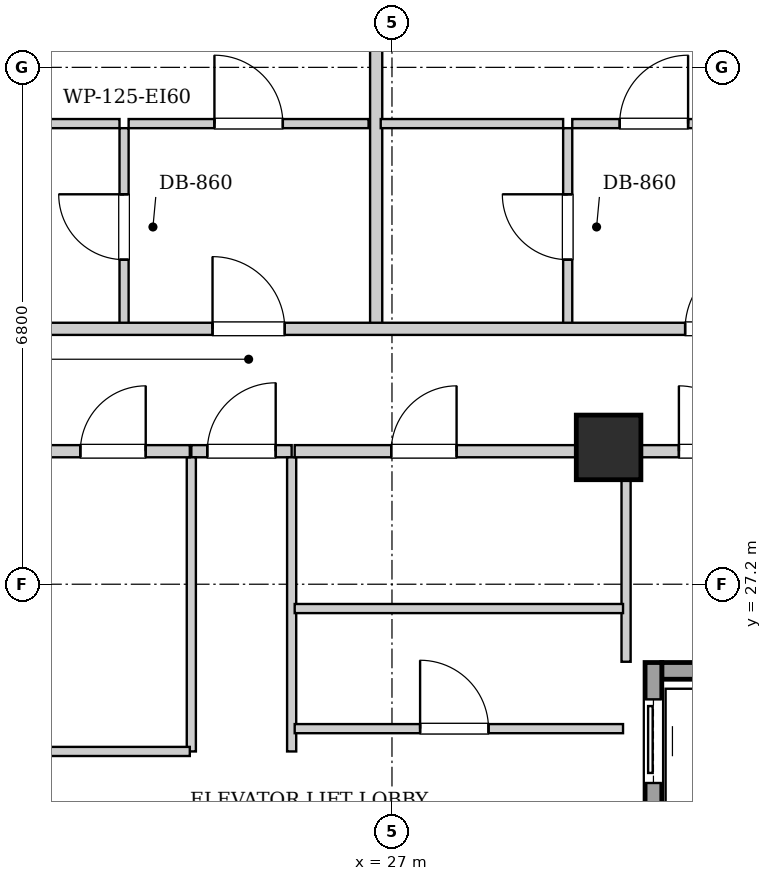
"""IFC4 building model, lengths in metres.
Left out: names, types, materials, properties, quantities, classifications, styles, units other than length and angle.
Written with IfcOpenShell. Run it as: python <this file> out.ifc"""

import sys

from ifc_helpers import new_model, si_unit, direction, frame, frame_2d, origin, origin_2d, place, context, subcontext, project, spatial, rectangle, extrude, element, fill, save


model = new_model("IFC4")
c1 = context("Model", 3, precision=1e-05, world=origin(), true_north=direction((0.0, 1.0)))
c2 = subcontext(c1, "Body", "Model", "MODEL_VIEW")
j1 = project(units=[si_unit("LENGTHUNIT", "METRE"), si_unit("PLANEANGLEUNIT", "RADIAN")], contexts=[c1])
p1 = place(None, origin())
s1 = spatial("IfcSite", under=j1, at=p1, CompositionType="ELEMENT")
p2 = place(p1, origin())
s2 = spatial("IfcBuilding", under=s1, at=p2, CompositionType="ELEMENT")
p3 = place(p2, frame((0.0, 0.0, 214.0)))
s3 = spatial("IfcBuildingStorey", under=s2, at=p3, CompositionType="ELEMENT", Elevation=214.0)
p4 = place(p3, frame((29.85, 29.0, 0.0), z_axis=(0.0, 0.0, 1.0), x_axis=(1.0, 0.0, 0.0)))
e1 = element("IfcColumn", 1, at=p4, inside=s3, PredefinedType="COLUMN", context=c2, shape_type="SweptSolid", body=[
    extrude(rectangle(XDim=0.85, YDim=0.85, at=origin_2d()), origin(), (0.0, 0.0, 1.0), 3.3),
])
p5 = place(p3, frame((30.55, 26.06, 0.0), z_axis=(0.0, 0.0, 1.0), x_axis=(1.0, 0.0, 0.0)))
e2 = element("IfcWall", 2, at=p5, inside=s3, PredefinedType="SHEAR", context=c2, shape_type="SweptSolid", body=[
    extrude(rectangle(XDim=1.9, YDim=0.22, at=frame_2d((0.95, 0.0))), origin(), (0.0, 0.0, 1.0), 3.04),
])
p6 = place(p3, frame((30.44, 24.1, 0.0), z_axis=(0.0, 0.0, 1.0), x_axis=(0.0, 1.0, 0.0)))
e3 = element("IfcWall", 3, at=p6, inside=s3, PredefinedType="SHEAR", context=c2, shape_type="SweptSolid", body=[
    extrude(rectangle(XDim=2.07, YDim=0.22, at=frame_2d((1.035, 0.0))), origin(), (0.0, 0.0, 1.0), 3.04),
])
p7 = place(p6, frame((0.485, 0.0, 0.0)))
e4 = element("IfcOpeningElement", 4, at=p7, cuts=e3, PredefinedType="OPENING", context=c2, shape_type="SweptSolid", body=[
    extrude(rectangle(XDim=1.1, YDim=2.15, at=frame_2d((0.55, 1.075))), frame((0.0, 0.12, 0.0), z_axis=(0.0, -1.0, 0.0), x_axis=(1.0, 0.0, 0.0)), (0.0, 0.0, 1.0), 0.24),
])
p8 = place(p3, frame((24.36, 28.95, 0.0), z_axis=(0.0, 0.0, 1.0), x_axis=(1.0, 0.0, 0.0)))
e5 = element("IfcWall", 5, at=p8, inside=s3, PredefinedType="PARTITIONING", context=c2, shape_type="SweptSolid", body=[
    extrude(rectangle(XDim=1.32, YDim=0.16, at=frame_2d((0.66, 0.0))), origin(), (0.0, 0.0, 1.0), 2.556),
])
p9 = place(p8, frame((0.21, 0.0, 0.0)))
e6 = element("IfcOpeningElement", 6, at=p9, cuts=e5, PredefinedType="OPENING", context=c2, shape_type="SweptSolid", body=[
    extrude(rectangle(XDim=0.9, YDim=2.05, at=frame_2d((0.45, 1.025))), frame((0.0, 0.09, 0.0), z_axis=(0.0, -1.0, 0.0), x_axis=(1.0, 0.0, 0.0)), (0.0, 0.0, 1.0), 0.18),
])
for number, where, z_axis, x_axis in (
    (7, (24.36, 25.0, 0.0), (0.0, 0.0, 1.0), (0.0, 1.0, 0.0)),
    (8, (25.68, 25.0, 0.0), (0.0, 0.0, 1.0), (0.0, 1.0, 0.0)),
):
    element("IfcWall", number, at=place(p3, frame(where, z_axis=z_axis, x_axis=x_axis)), inside=s3, PredefinedType="PARTITIONING", context=c2, shape_type="SweptSolid", body=[
        extrude(rectangle(XDim=3.87, YDim=0.12, at=frame_2d((1.935, 0.0))), origin(), (0.0, 0.0, 1.0), 3.04),
    ])
p10 = place(p3, frame((30.08, 26.18, 0.0), z_axis=(0.0, 0.0, 1.0), x_axis=(0.0, 1.0, 0.0)))
e9 = element("IfcWall", 9, at=p10, inside=s3, PredefinedType="PARTITIONING", context=c2, shape_type="SweptSolid", body=[
    extrude(rectangle(XDim=2.68, YDim=0.12, at=frame_2d((1.34, 0.0))), origin(), (0.0, 0.0, 1.0), 3.04),
])
p11 = place(p3, frame((30.08, 28.95, 0.0), z_axis=(0.0, 0.0, 1.0), x_axis=(1.0, 0.0, 0.0)))
e10 = element("IfcWall", 10, at=p11, inside=s3, PredefinedType="PARTITIONING", context=c2, shape_type="SweptSolid", body=[
    extrude(rectangle(XDim=2.96, YDim=0.16, at=frame_2d((1.48, 0.0))), origin(), (0.0, 0.0, 1.0), 3.04),
])
p12 = place(p11, frame((0.695, 0.0, 0.0)))
e11 = element("IfcOpeningElement", 11, at=p12, cuts=e10, PredefinedType="OPENING", context=c2, shape_type="SweptSolid", body=[
    extrude(rectangle(XDim=0.86, YDim=2.05, at=frame_2d((0.43, 1.025))), frame((0.0, 0.09, 0.0), z_axis=(0.0, -1.0, 0.0), x_axis=(1.0, 0.0, 0.0)), (0.0, 0.0, 1.0), 0.18),
])
p13 = place(p3, frame((22.3, 25.0, 0.0), z_axis=(0.0, 0.0, 1.0), x_axis=(1.0, 0.0, 0.0)))
e12 = element("IfcWall", 12, at=p13, inside=s3, PredefinedType="PARTITIONING", context=c2, shape_type="SweptSolid", body=[
    extrude(rectangle(XDim=2.04, YDim=0.12, at=frame_2d((1.02, 0.0))), origin(), (0.0, 0.0, 1.0), 3.04),
])
p14 = place(p3, frame((22.28, 28.95, 0.0), z_axis=(0.0, 0.0, 1.0), x_axis=(1.0, 0.0, 0.0)))
e13 = element("IfcWall", 13, at=p14, inside=s3, PredefinedType="PARTITIONING", context=c2, shape_type="SweptSolid", body=[
    extrude(rectangle(XDim=2.06, YDim=0.16, at=frame_2d((1.03, 0.0))), origin(), (0.0, 0.0, 1.0), 2.556),
])
p15 = place(p14, frame((0.62, 0.0, 0.0)))
e14 = element("IfcOpeningElement", 14, at=p15, cuts=e13, PredefinedType="OPENING", context=c2, shape_type="SweptSolid", body=[
    extrude(rectangle(XDim=0.86, YDim=2.05, at=frame_2d((0.43, 1.025))), frame((0.0, 0.09, 0.0), z_axis=(0.0, -1.0, 0.0), x_axis=(1.0, 0.0, 0.0)), (0.0, 0.0, 1.0), 0.18),
])
p16 = place(p3, frame((25.72, 26.88, 0.0), z_axis=(0.0, 0.0, 1.0), x_axis=(1.0, 0.0, 0.0)))
e15 = element("IfcWall", 15, at=p16, inside=s3, PredefinedType="PARTITIONING", context=c2, shape_type="SweptSolid", body=[
    extrude(rectangle(XDim=4.32, YDim=0.12, at=frame_2d((2.16, 0.0))), origin(), (0.0, 0.0, 1.0), 3.04),
])
p17 = place(p3, frame((25.72, 25.3, 0.0), z_axis=(0.0, 0.0, 1.0), x_axis=(1.0, 0.0, 0.0)))
e16 = element("IfcWall", 16, at=p17, inside=s3, PredefinedType="PARTITIONING", context=c2, shape_type="SweptSolid", body=[
    extrude(rectangle(XDim=4.32, YDim=0.12, at=frame_2d((2.16, 0.0))), origin(), (0.0, 0.0, 1.0), 3.04),
])
p18 = place(p17, frame((1.65, 0.0, 0.0)))
e17 = element("IfcOpeningElement", 17, at=p18, cuts=e16, PredefinedType="OPENING", context=c2, shape_type="SweptSolid", body=[
    extrude(rectangle(XDim=0.9, YDim=2.05, at=frame_2d((0.45, 1.025))), frame((0.0, 0.07, 0.0), z_axis=(0.0, -1.0, 0.0), x_axis=(1.0, 0.0, 0.0)), (0.0, 0.0, 1.0), 0.14),
])
p19 = place(p3, frame((25.72, 28.95, 0.0), z_axis=(0.0, 0.0, 1.0), x_axis=(1.0, 0.0, 0.0)))
e18 = element("IfcWall", 18, at=p19, inside=s3, PredefinedType="PARTITIONING", context=c2, shape_type="SweptSolid", body=[
    extrude(rectangle(XDim=4.32, YDim=0.16, at=frame_2d((2.16, 0.0))), origin(), (0.0, 0.0, 1.0), 2.556),
])
p20 = place(p19, frame((1.27, 0.0, 0.0)))
e19 = element("IfcOpeningElement", 19, at=p20, cuts=e18, PredefinedType="OPENING", context=c2, shape_type="SweptSolid", body=[
    extrude(rectangle(XDim=0.86, YDim=2.05, at=frame_2d((0.43, 1.025))), frame((0.0, 0.09, 0.0), z_axis=(0.0, -1.0, 0.0), x_axis=(1.0, 0.0, 0.0)), (0.0, 0.0, 1.0), 0.18),
])
p21 = place(p3, frame((23.475, 30.6, 0.0), z_axis=(0.0, 0.0, 1.0), x_axis=(0.0, 1.0, 0.0)))
e20 = element("IfcWall", 20, at=p21, inside=s3, PredefinedType="PARTITIONING", context=c2, shape_type="SweptSolid", body=[
    extrude(rectangle(XDim=2.6, YDim=0.12, at=frame_2d((1.3, 0.0))), origin(), (0.0, 0.0, 1.0), 3.04),
])
p22 = place(p21, frame((0.87, 0.0, 0.0)))
e21 = element("IfcOpeningElement", 21, at=p22, cuts=e20, PredefinedType="OPENING", context=c2, shape_type="SweptSolid", body=[
    extrude(rectangle(XDim=0.86, YDim=2.05, at=frame_2d((0.43, 1.025))), frame((0.0, 0.07, 0.0), z_axis=(0.0, -1.0, 0.0), x_axis=(1.0, 0.0, 0.0)), (0.0, 0.0, 1.0), 0.14),
])
p23 = place(p3, frame((21.565, 33.26, 0.0), z_axis=(0.0, 0.0, 1.0), x_axis=(1.0, 0.0, 0.0)))
e22 = element("IfcWall", 22, at=p23, inside=s3, PredefinedType="PARTITIONING", context=c2, shape_type="SweptSolid", body=[
    extrude(rectangle(XDim=1.85, YDim=0.12, at=frame_2d((0.925, 0.0))), origin(), (0.0, 0.0, 1.0), 3.04),
])
p24 = place(p3, frame((23.535, 33.26, 0.0), z_axis=(0.0, 0.0, 1.0), x_axis=(1.0, 0.0, 0.0)))
e23 = element("IfcWall", 23, at=p24, inside=s3, PredefinedType="PARTITIONING", context=c2, shape_type="SweptSolid", body=[
    extrude(rectangle(XDim=3.157, YDim=0.12, at=frame_2d((1.579, 0.0))), origin(), (0.0, 0.0, 1.0), 3.04),
])
p25 = place(p24, frame((1.129, 0.0, 0.0)))
e24 = element("IfcOpeningElement", 24, at=p25, cuts=e23, PredefinedType="OPENING", context=c2, shape_type="SweptSolid", body=[
    extrude(rectangle(XDim=0.9, YDim=2.05, at=frame_2d((0.45, 1.025))), frame((0.0, 0.07, 0.0), z_axis=(0.0, -1.0, 0.0), x_axis=(1.0, 0.0, 0.0)), (0.0, 0.0, 1.0), 0.14),
])
p26 = place(p3, frame((26.792, 30.6, 0.0), z_axis=(0.0, 0.0, 1.0), x_axis=(0.0, 1.0, 0.0)))
e25 = element("IfcWall", 25, at=p26, inside=s3, PredefinedType="PARTITIONING", context=c2, shape_type="SweptSolid", body=[
    extrude(rectangle(XDim=9.32, YDim=0.16, at=frame_2d((4.66, 0.0))), origin(), (0.0, 0.0, 1.0), 3.04),
])
p27 = place(p3, frame((29.312, 30.6, 0.0), z_axis=(0.0, 0.0, 1.0), x_axis=(0.0, 1.0, 0.0)))
e26 = element("IfcWall", 26, at=p27, inside=s3, PredefinedType="PARTITIONING", context=c2, shape_type="SweptSolid", body=[
    extrude(rectangle(XDim=2.6, YDim=0.12, at=frame_2d((1.3, 0.0))), origin(), (0.0, 0.0, 1.0), 3.04),
])
p28 = place(p27, frame((0.87, 0.0, 0.0)))
e27 = element("IfcOpeningElement", 27, at=p28, cuts=e26, PredefinedType="OPENING", context=c2, shape_type="SweptSolid", body=[
    extrude(rectangle(XDim=0.86, YDim=2.05, at=frame_2d((0.43, 1.025))), frame((0.0, 0.07, 0.0), z_axis=(0.0, -1.0, 0.0), x_axis=(1.0, 0.0, 0.0)), (0.0, 0.0, 1.0), 0.14),
])
p29 = place(p3, frame((26.852, 33.26, 0.0), z_axis=(0.0, 0.0, 1.0), x_axis=(1.0, 0.0, 0.0)))
e28 = element("IfcWall", 28, at=p29, inside=s3, PredefinedType="PARTITIONING", context=c2, shape_type="SweptSolid", body=[
    extrude(rectangle(XDim=2.4, YDim=0.12, at=frame_2d((1.2, 0.0))), origin(), (0.0, 0.0, 1.0), 3.04),
])
p30 = place(p3, frame((29.372, 33.26, 0.0), z_axis=(0.0, 0.0, 1.0), x_axis=(1.0, 0.0, 0.0)))
e29 = element("IfcWall", 29, at=p30, inside=s3, PredefinedType="PARTITIONING", context=c2, shape_type="SweptSolid", body=[
    extrude(rectangle(XDim=2.148, YDim=0.12, at=frame_2d((1.074, 0.0))), origin(), (0.0, 0.0, 1.0), 3.04),
])
p31 = place(p30, frame((0.624, 0.0, 0.0)))
e30 = element("IfcOpeningElement", 30, at=p31, cuts=e29, PredefinedType="OPENING", context=c2, shape_type="SweptSolid", body=[
    extrude(rectangle(XDim=0.9, YDim=2.05, at=frame_2d((0.45, 1.025))), frame((0.0, 0.07, 0.0), z_axis=(0.0, -1.0, 0.0), x_axis=(1.0, 0.0, 0.0)), (0.0, 0.0, 1.0), 0.14),
])
p32 = place(p3, frame((13.15, 30.56, 0.0), z_axis=(0.0, 0.0, 1.0), x_axis=(1.0, 0.0, 0.0)))
e31 = element("IfcWall", 31, at=p32, inside=s3, PredefinedType="PARTITIONING", context=c2, shape_type="SweptSolid", body=[
    extrude(rectangle(XDim=24.6, YDim=0.16, at=frame_2d((12.3, 0.0))), origin(), (0.0, 0.0, 1.0), 3.04),
])
p33 = place(p32, frame((3.115, 0.0, 0.0)))
e32 = element("IfcOpeningElement", 32, at=p33, cuts=e31, PredefinedType="OPENING", context=c2, shape_type="SweptSolid", body=[
    extrude(rectangle(XDim=0.95, YDim=2.1, at=frame_2d((0.475, 1.05))), frame((0.0, 0.09, 0.0), z_axis=(0.0, -1.0, 0.0), x_axis=(1.0, 0.0, 0.0)), (0.0, 0.0, 1.0), 0.18),
])
p34 = place(p32, frame((11.489, 0.0, 0.0)))
e33 = element("IfcOpeningElement", 33, at=p34, cuts=e31, PredefinedType="OPENING", context=c2, shape_type="SweptSolid", body=[
    extrude(rectangle(XDim=0.95, YDim=2.1, at=frame_2d((0.475, 1.05))), frame((0.0, 0.09, 0.0), z_axis=(0.0, -1.0, 0.0), x_axis=(1.0, 0.0, 0.0)), (0.0, 0.0, 1.0), 0.18),
])
p35 = place(p32, frame((17.707, 0.0, 0.0)))
e34 = element("IfcOpeningElement", 34, at=p35, cuts=e31, PredefinedType="OPENING", context=c2, shape_type="SweptSolid", body=[
    extrude(rectangle(XDim=0.95, YDim=2.1, at=frame_2d((0.475, 1.05))), frame((0.0, 0.09, 0.0), z_axis=(0.0, -1.0, 0.0), x_axis=(1.0, 0.0, 0.0)), (0.0, 0.0, 1.0), 0.18),
])
p36 = place(p7, origin())
e35 = element("IfcDoor", 35, at=p36, inside=s3, OperationType="SLIDING_TO_LEFT", PredefinedType="DOOR", context=c2, shape_type="SweptSolid", body=[
    extrude(rectangle(XDim=1.1, YDim=2.15, at=frame_2d((0.55, 1.075))), frame((0.0, 0.025, 0.0), z_axis=(0.0, -1.0, 0.0), x_axis=(1.0, 0.0, 0.0)), (0.0, 0.0, 1.0), 0.05),
])
fill(e4, e35)
p37 = place(p9, origin())
e36 = element("IfcDoor", 36, at=p37, inside=s3, OperationType="SINGLE_SWING_RIGHT", PredefinedType="DOOR", context=c2, shape_type="SweptSolid", body=[
    extrude(rectangle(XDim=0.9, YDim=2.05, at=frame_2d((0.45, 1.025))), frame((0.0, 0.025, 0.0), z_axis=(0.0, -1.0, 0.0), x_axis=(1.0, 0.0, 0.0)), (0.0, 0.0, 1.0), 0.05),
])
fill(e6, e36)
p38 = place(p12, origin())
e37 = element("IfcDoor", 37, at=p38, inside=s3, OperationType="SINGLE_SWING_LEFT", PredefinedType="DOOR", context=c2, shape_type="SweptSolid", body=[
    extrude(rectangle(XDim=0.86, YDim=2.05, at=frame_2d((0.43, 1.025))), frame((0.0, 0.025, 0.0), z_axis=(0.0, -1.0, 0.0), x_axis=(1.0, 0.0, 0.0)), (0.0, 0.0, 1.0), 0.05),
])
fill(e11, e37)
p39 = place(p15, origin())
e38 = element("IfcDoor", 38, at=p39, inside=s3, OperationType="SINGLE_SWING_RIGHT", PredefinedType="DOOR", context=c2, shape_type="SweptSolid", body=[
    extrude(rectangle(XDim=0.86, YDim=2.05, at=frame_2d((0.43, 1.025))), frame((0.0, 0.025, 0.0), z_axis=(0.0, -1.0, 0.0), x_axis=(1.0, 0.0, 0.0)), (0.0, 0.0, 1.0), 0.05),
])
fill(e14, e38)
p40 = place(p18, origin())
e39 = element("IfcDoor", 39, at=p40, inside=s3, OperationType="SINGLE_SWING_LEFT", PredefinedType="DOOR", context=c2, shape_type="SweptSolid", body=[
    extrude(rectangle(XDim=0.9, YDim=2.05, at=frame_2d((0.45, 1.025))), frame((0.0, 0.025, 0.0), z_axis=(0.0, -1.0, 0.0), x_axis=(1.0, 0.0, 0.0)), (0.0, 0.0, 1.0), 0.05),
])
fill(e17, e39)
p41 = place(p20, origin())
e40 = element("IfcDoor", 40, at=p41, inside=s3, OperationType="SINGLE_SWING_RIGHT", PredefinedType="DOOR", context=c2, shape_type="SweptSolid", body=[
    extrude(rectangle(XDim=0.86, YDim=2.05, at=frame_2d((0.43, 1.025))), frame((0.0, 0.025, 0.0), z_axis=(0.0, -1.0, 0.0), x_axis=(1.0, 0.0, 0.0)), (0.0, 0.0, 1.0), 0.05),
])
fill(e19, e40)
p42 = place(p22, origin())
e41 = element("IfcDoor", 41, at=p42, inside=s3, OperationType="SINGLE_SWING_RIGHT", PredefinedType="DOOR", context=c2, shape_type="SweptSolid", body=[
    extrude(rectangle(XDim=0.86, YDim=2.05, at=frame_2d((0.43, 1.025))), frame((0.0, 0.025, 0.0), z_axis=(0.0, -1.0, 0.0), x_axis=(1.0, 0.0, 0.0)), (0.0, 0.0, 1.0), 0.05),
])
fill(e21, e41)
p43 = place(p25, origin())
e42 = element("IfcDoor", 42, at=p43, inside=s3, OperationType="SINGLE_SWING_LEFT", PredefinedType="DOOR", context=c2, shape_type="SweptSolid", body=[
    extrude(rectangle(XDim=0.9, YDim=2.05, at=frame_2d((0.45, 1.025))), frame((0.0, 0.025, 0.0), z_axis=(0.0, -1.0, 0.0), x_axis=(1.0, 0.0, 0.0)), (0.0, 0.0, 1.0), 0.05),
])
fill(e24, e42)
p44 = place(p28, origin())
e43 = element("IfcDoor", 43, at=p44, inside=s3, OperationType="SINGLE_SWING_RIGHT", PredefinedType="DOOR", context=c2, shape_type="SweptSolid", body=[
    extrude(rectangle(XDim=0.86, YDim=2.05, at=frame_2d((0.43, 1.025))), frame((0.0, 0.025, 0.0), z_axis=(0.0, -1.0, 0.0), x_axis=(1.0, 0.0, 0.0)), (0.0, 0.0, 1.0), 0.05),
])
fill(e27, e43)
p45 = place(p31, origin())
e44 = element("IfcDoor", 44, at=p45, inside=s3, OperationType="SINGLE_SWING_RIGHT", PredefinedType="DOOR", context=c2, shape_type="SweptSolid", body=[
    extrude(rectangle(XDim=0.9, YDim=2.05, at=frame_2d((0.45, 1.025))), frame((0.0, 0.025, 0.0), z_axis=(0.0, -1.0, 0.0), x_axis=(1.0, 0.0, 0.0)), (0.0, 0.0, 1.0), 0.05),
])
fill(e30, e44)
p46 = place(p34, origin())
e45 = element("IfcDoor", 45, at=p46, inside=s3, OperationType="SINGLE_SWING_LEFT", PredefinedType="DOOR", context=c2, shape_type="SweptSolid", body=[
    extrude(rectangle(XDim=0.95, YDim=2.1, at=frame_2d((0.475, 1.05))), frame((0.0, 0.025, 0.0), z_axis=(0.0, -1.0, 0.0), x_axis=(1.0, 0.0, 0.0)), (0.0, 0.0, 1.0), 0.05),
])
fill(e33, e45)
p47 = place(p35, origin())
e46 = element("IfcDoor", 46, at=p47, inside=s3, OperationType="SINGLE_SWING_RIGHT", PredefinedType="DOOR", context=c2, shape_type="SweptSolid", body=[
    extrude(rectangle(XDim=0.95, YDim=2.1, at=frame_2d((0.475, 1.05))), frame((0.0, 0.025, 0.0), z_axis=(0.0, -1.0, 0.0), x_axis=(1.0, 0.0, 0.0)), (0.0, 0.0, 1.0), 0.05),
])
fill(e34, e46)
save(model, sys.argv[1])
